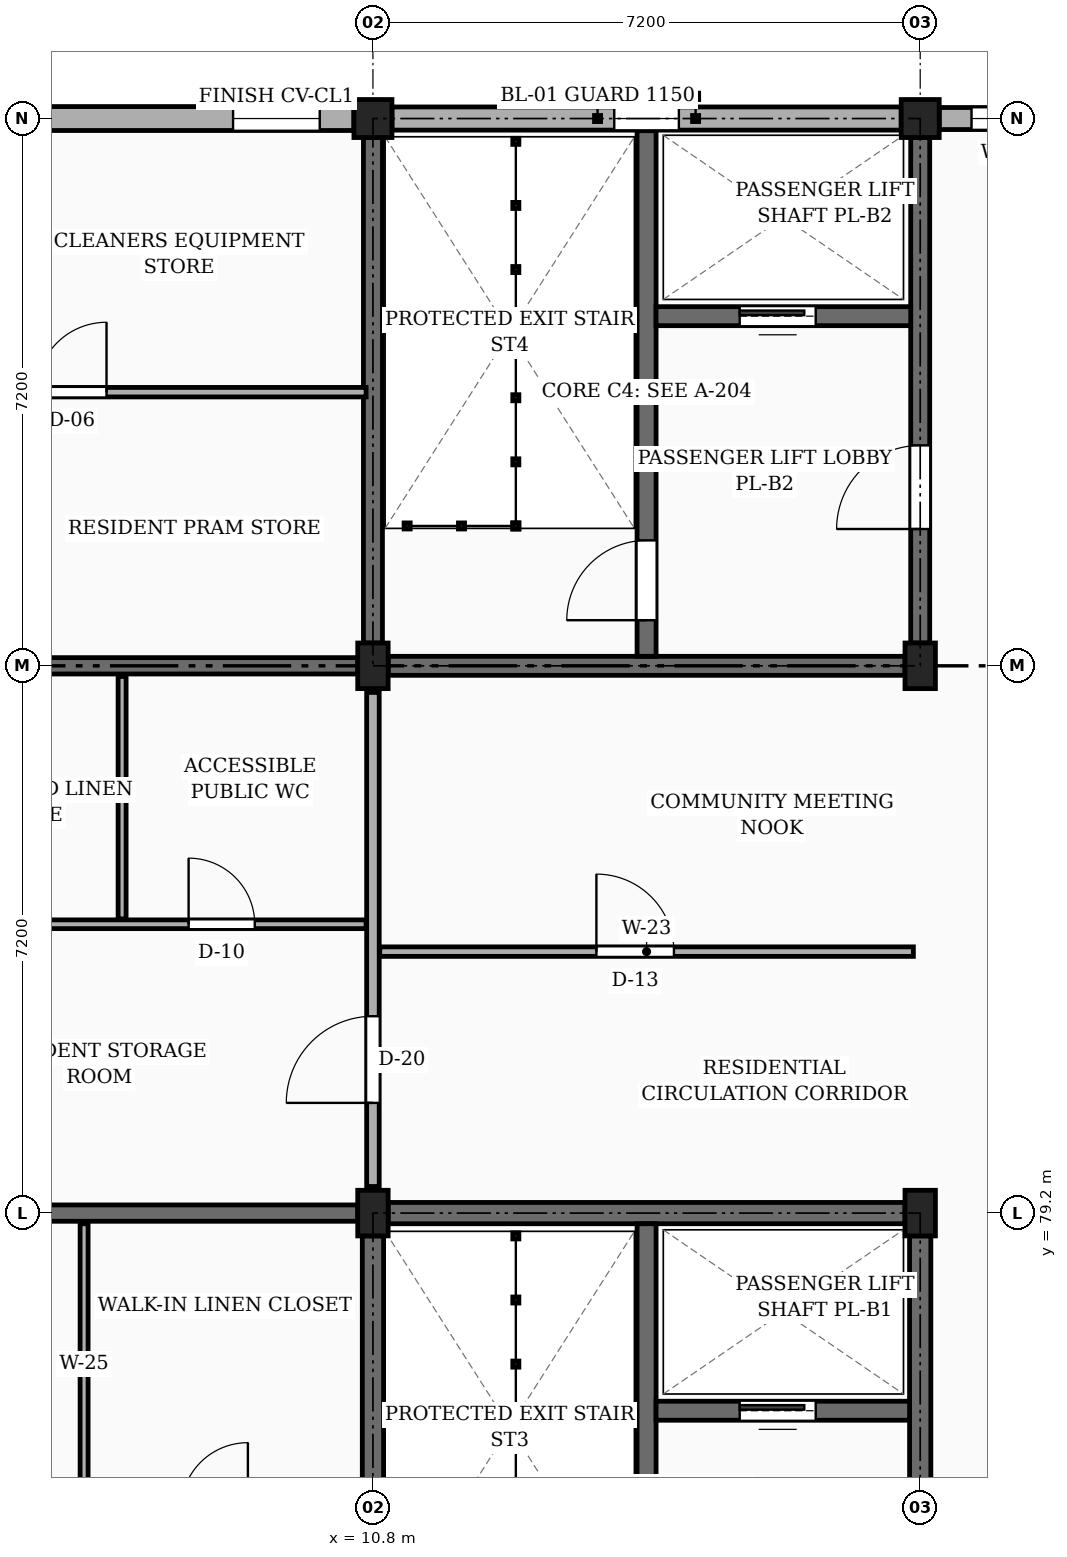
"""IFC4 building model, lengths in metres.
Left out: names, types, materials, properties, quantities, classifications, styles, units other than length and angle.
Written with IfcOpenShell. Run it as: python <this file> out.ifc"""

import sys

from ifc_helpers import new_model, si_unit, direction, frame, frame_2d, origin, origin_2d, place, context, subcontext, project, spatial, rectangle, extrude, element, fill, save


model = new_model("IFC4")
c1 = context("Model", 3, precision=1e-05, world=origin(), true_north=direction((0.0, 1.0)))
c2 = subcontext(c1, "Body", "Model", "MODEL_VIEW")
j1 = project(units=[si_unit("LENGTHUNIT", "METRE"), si_unit("PLANEANGLEUNIT", "RADIAN")], contexts=[c1])
p1 = place(None, origin())
s1 = spatial("IfcSite", under=j1, at=p1, CompositionType="ELEMENT")
p2 = place(p1, origin())
s2 = spatial("IfcBuilding", under=s1, at=p2, CompositionType="ELEMENT")
p3 = place(p2, frame((0.0, 0.0, 26.55)))
s3 = spatial("IfcBuildingStorey", under=s2, at=p3, CompositionType="ELEMENT", Elevation=26.55)
for number, where, z_axis, x_axis in (
    (1, (10.8, 79.2, 0.0), (0.0, 0.0, 1.0), (1.0, 0.0, 0.0)),
    (2, (10.8, 86.4, 0.0), (0.0, 0.0, 1.0), (1.0, 0.0, 0.0)),
):
    element("IfcColumn", number, at=place(p3, frame(where, z_axis=z_axis, x_axis=x_axis)), inside=s3, PredefinedType="COLUMN", context=c2, shape_type="SweptSolid", body=[
        extrude(rectangle(XDim=0.4, YDim=0.6, at=origin_2d()), origin(), (0.0, 0.0, 1.0), 3.15),
    ])
p4 = place(p3, frame((10.8, 93.6, 0.0), z_axis=(0.0, 0.0, 1.0), x_axis=(1.0, 0.0, 0.0)))
e3 = element("IfcColumn", 3, at=p4, inside=s3, PredefinedType="COLUMN", context=c2, shape_type="SweptSolid", body=[
    extrude(rectangle(XDim=0.5, YDim=0.5, at=origin_2d()), origin(), (0.0, 0.0, 1.0), 3.15),
])
for number, where, z_axis, x_axis in (
    (4, (18.0, 79.2, 0.0), (0.0, 0.0, 1.0), (1.0, 0.0, 0.0)),
    (5, (18.0, 86.4, 0.0), (0.0, 0.0, 1.0), (1.0, 0.0, 0.0)),
):
    element("IfcColumn", number, at=place(p3, frame(where, z_axis=z_axis, x_axis=x_axis)), inside=s3, PredefinedType="COLUMN", context=c2, shape_type="SweptSolid", body=[
        extrude(rectangle(XDim=0.4, YDim=0.6, at=origin_2d()), origin(), (0.0, 0.0, 1.0), 3.15),
    ])
p5 = place(p3, frame((18.0, 93.6, 0.0), z_axis=(0.0, 0.0, 1.0), x_axis=(1.0, 0.0, 0.0)))
e6 = element("IfcColumn", 6, at=p5, inside=s3, PredefinedType="COLUMN", context=c2, shape_type="SweptSolid", body=[
    extrude(rectangle(XDim=0.5, YDim=0.5, at=origin_2d()), origin(), (0.0, 0.0, 1.0), 3.15),
])
p6 = place(p3, frame((3.85, 79.2, 0.0), z_axis=(0.0, 0.0, 1.0), x_axis=(1.0, 0.0, 0.0)))
e7 = element("IfcWall", 7, at=p6, inside=s3, PredefinedType="SOLIDWALL", context=c2, shape_type="SweptSolid", body=[
    extrude(rectangle(XDim=6.75, YDim=0.215, at=frame_2d((3.375, 0.0))), origin(), (0.0, 0.0, 1.0), 2.22),
])
p7 = place(p3, frame((3.85, 86.4, 0.0), z_axis=(0.0, 0.0, 1.0), x_axis=(1.0, 0.0, 0.0)))
e8 = element("IfcWall", 8, at=p7, inside=s3, PredefinedType="SOLIDWALL", context=c2, shape_type="SweptSolid", body=[
    extrude(rectangle(XDim=6.75, YDim=0.215, at=frame_2d((3.375, 0.0))), origin(), (0.0, 0.0, 1.0), 2.22),
])
p8 = place(p7, frame((1.35, 0.0, 0.0)))
e9 = element("IfcOpeningElement", 9, at=p8, cuts=e8, PredefinedType="OPENING", context=c2, shape_type="SweptSolid", body=[
    extrude(rectangle(XDim=0.98, YDim=2.12, at=frame_2d((0.49, 1.06))), frame((0.0, 0.118, 0.0), z_axis=(0.0, -1.0, 0.0), x_axis=(1.0, 0.0, 0.0)), (0.0, 0.0, 1.0), 0.235),
])
p9 = place(p3, frame((24.95, 93.6, 0.0), z_axis=(0.0, 0.0, 1.0), x_axis=(-1.0, 0.0, 0.0)))
e10 = element("IfcWall", 10, at=p9, inside=s3, PredefinedType="SOLIDWALL", context=c2, shape_type="SweptSolid", body=[
    extrude(rectangle(XDim=6.7, YDim=0.29, at=frame_2d((3.35, 0.0))), origin(), (0.0, 0.0, 1.0), 2.46),
])
p10 = place(p9, frame((0.785, 0.0, 0.78)))
e11 = element("IfcOpeningElement", 11, at=p10, cuts=e10, PredefinedType="OPENING", context=c2, shape_type="SweptSolid", body=[
    extrude(rectangle(XDim=1.44, YDim=1.26, at=frame_2d((0.72, 0.63))), frame((0.0, 0.155, 0.0), z_axis=(0.0, -1.0, 0.0), x_axis=(1.0, 0.0, 0.0)), (0.0, 0.0, 1.0), 0.31),
])
p11 = place(p9, frame((3.37, 0.0, 0.78)))
e12 = element("IfcOpeningElement", 12, at=p11, cuts=e10, PredefinedType="OPENING", context=c2, shape_type="SweptSolid", body=[
    extrude(rectangle(XDim=0.98, YDim=1.36, at=frame_2d((0.49, 0.68))), frame((0.0, 0.155, 0.0), z_axis=(0.0, -1.0, 0.0), x_axis=(1.0, 0.0, 0.0)), (0.0, 0.0, 1.0), 0.31),
])
p12 = place(p9, frame((5.135, 0.0, 0.78)))
e13 = element("IfcOpeningElement", 13, at=p12, cuts=e10, PredefinedType="OPENING", context=c2, shape_type="SweptSolid", body=[
    extrude(rectangle(XDim=1.14, YDim=1.36, at=frame_2d((0.57, 0.68))), frame((0.0, 0.155, 0.0), z_axis=(0.0, -1.0, 0.0), x_axis=(1.0, 0.0, 0.0)), (0.0, 0.0, 1.0), 0.31),
])
p13 = place(p3, frame((17.75, 93.6, 0.0), z_axis=(0.0, 0.0, 1.0), x_axis=(-1.0, 0.0, 0.0)))
e14 = element("IfcWall", 14, at=p13, inside=s3, PredefinedType="SOLIDWALL", context=c2, shape_type="SweptSolid", body=[
    extrude(rectangle(XDim=6.7, YDim=0.305, at=frame_2d((3.35, 0.0))), origin(), (0.0, 0.0, 1.0), 2.46),
])
p14 = place(p13, frame((2.925, 0.0, 0.9)))
e15 = element("IfcOpeningElement", 15, at=p14, cuts=e14, PredefinedType="OPENING", context=c2, shape_type="SweptSolid", body=[
    extrude(rectangle(XDim=0.85, YDim=1.15, at=frame_2d((0.425, 0.575))), frame((0.0, 0.163, 0.0), z_axis=(0.0, -1.0, 0.0), x_axis=(1.0, 0.0, 0.0)), (0.0, 0.0, 1.0), 0.325),
])
p15 = place(p3, frame((10.55, 93.6, 0.0), z_axis=(0.0, 0.0, 1.0), x_axis=(-1.0, 0.0, 0.0)))
e16 = element("IfcWall", 16, at=p15, inside=s3, PredefinedType="SOLIDWALL", context=c2, shape_type="SweptSolid", body=[
    extrude(rectangle(XDim=6.7, YDim=0.315, at=frame_2d((3.35, 0.0))), origin(), (0.0, 0.0, 1.0), 2.46),
])
p16 = place(p15, frame((0.45, 0.0, 0.78)))
e17 = element("IfcOpeningElement", 17, at=p16, cuts=e16, PredefinedType="OPENING", context=c2, shape_type="SweptSolid", body=[
    extrude(rectangle(XDim=1.14, YDim=1.36, at=frame_2d((0.57, 0.68))), frame((0.0, 0.167, 0.0), z_axis=(0.0, -1.0, 0.0), x_axis=(1.0, 0.0, 0.0)), (0.0, 0.0, 1.0), 0.335),
])
p17 = place(p15, frame((4.65, 0.0, 0.78)))
e18 = element("IfcOpeningElement", 18, at=p17, cuts=e16, PredefinedType="OPENING", context=c2, shape_type="SweptSolid", body=[
    extrude(rectangle(XDim=1.3, YDim=1.36, at=frame_2d((0.65, 0.68))), frame((0.0, 0.167, 0.0), z_axis=(0.0, -1.0, 0.0), x_axis=(1.0, 0.0, 0.0)), (0.0, 0.0, 1.0), 0.335),
])
p18 = place(p3, frame((10.8, 72.3, 0.0), z_axis=(0.0, 0.0, 1.0), x_axis=(0.0, 1.0, 0.0)))
e19 = element("IfcWall", 19, at=p18, inside=s3, PredefinedType="SHEAR", context=c2, shape_type="SweptSolid", body=[
    extrude(rectangle(XDim=6.6, YDim=0.28, at=frame_2d((3.3, 0.0))), origin(), (0.0, 0.0, 1.0), 2.89),
])
p19 = place(p3, frame((11.0, 79.2, 0.0), z_axis=(0.0, 0.0, 1.0), x_axis=(1.0, 0.0, 0.0)))
e20 = element("IfcWall", 20, at=p19, inside=s3, PredefinedType="SHEAR", context=c2, shape_type="SweptSolid", body=[
    extrude(rectangle(XDim=6.8, YDim=0.28, at=frame_2d((3.4, 0.0))), origin(), (0.0, 0.0, 1.0), 2.89),
])
p20 = place(p3, frame((18.0, 72.3, 0.0), z_axis=(0.0, 0.0, 1.0), x_axis=(0.0, 1.0, 0.0)))
e21 = element("IfcWall", 21, at=p20, inside=s3, PredefinedType="SHEAR", context=c2, shape_type="SweptSolid", body=[
    extrude(rectangle(XDim=6.6, YDim=0.28, at=frame_2d((3.3, 0.0))), origin(), (0.0, 0.0, 1.0), 2.89),
])
p21 = place(p20, frame((1.5, 0.0, 0.0)))
e22 = element("IfcOpeningElement", 22, at=p21, cuts=e21, PredefinedType="OPENING", context=c2, shape_type="SweptSolid", body=[
    extrude(rectangle(XDim=1.1, YDim=2.15, at=frame_2d((0.55, 1.075))), frame((0.0, 0.15, 0.0), z_axis=(0.0, -1.0, 0.0), x_axis=(1.0, 0.0, 0.0)), (0.0, 0.0, 1.0), 0.3),
])
p22 = place(p3, frame((14.4, 72.14, 0.0), z_axis=(0.0, 0.0, 1.0), x_axis=(0.0, 1.0, 0.0)))
e23 = element("IfcWall", 23, at=p22, inside=s3, PredefinedType="SHEAR", context=c2, shape_type="SweptSolid", body=[
    extrude(rectangle(XDim=6.92, YDim=0.25, at=frame_2d((3.46, 0.0))), origin(), (0.0, 0.0, 1.0), 2.89),
])
p23 = place(p22, frame((0.46, 0.0, 0.0)))
e24 = element("IfcOpeningElement", 24, at=p23, cuts=e23, PredefinedType="OPENING", context=c2, shape_type="SweptSolid", body=[
    extrude(rectangle(XDim=1.05, YDim=2.15, at=frame_2d((0.525, 1.075))), frame((0.0, 0.135, 0.0), z_axis=(0.0, -1.0, 0.0), x_axis=(1.0, 0.0, 0.0)), (0.0, 0.0, 1.0), 0.27),
])
p24 = place(p3, frame((14.525, 76.6, 0.0), z_axis=(0.0, 0.0, 1.0), x_axis=(1.0, 0.0, 0.0)))
e25 = element("IfcWall", 25, at=p24, inside=s3, PredefinedType="SHEAR", context=c2, shape_type="SweptSolid", body=[
    extrude(rectangle(XDim=3.335, YDim=0.25, at=frame_2d((1.667, 0.0))), origin(), (0.0, 0.0, 1.0), 2.89),
])
p25 = place(p24, frame((1.1, 0.0, 0.0)))
e26 = element("IfcOpeningElement", 26, at=p25, cuts=e25, PredefinedType="OPENING", context=c2, shape_type="SweptSolid", body=[
    extrude(rectangle(XDim=1.0, YDim=2.2, at=frame_2d((0.5, 1.1))), frame((0.0, 0.135, 0.0), z_axis=(0.0, -1.0, 0.0), x_axis=(1.0, 0.0, 0.0)), (0.0, 0.0, 1.0), 0.27),
])
p26 = place(p3, frame((10.8, 86.7, 0.0), z_axis=(0.0, 0.0, 1.0), x_axis=(0.0, 1.0, 0.0)))
e27 = element("IfcWall", 27, at=p26, inside=s3, PredefinedType="SHEAR", context=c2, shape_type="SweptSolid", body=[
    extrude(rectangle(XDim=6.65, YDim=0.25, at=frame_2d((3.325, 0.0))), origin(), (0.0, 0.0, 1.0), 2.89),
])
p27 = place(p3, frame((18.0, 86.7, 0.0), z_axis=(0.0, 0.0, 1.0), x_axis=(0.0, 1.0, 0.0)))
e28 = element("IfcWall", 28, at=p27, inside=s3, PredefinedType="SHEAR", context=c2, shape_type="SweptSolid", body=[
    extrude(rectangle(XDim=6.65, YDim=0.25, at=frame_2d((3.325, 0.0))), origin(), (0.0, 0.0, 1.0), 2.89),
])
p28 = place(p27, frame((1.5, 0.0, 0.0)))
e29 = element("IfcOpeningElement", 29, at=p28, cuts=e28, PredefinedType="OPENING", context=c2, shape_type="SweptSolid", body=[
    extrude(rectangle(XDim=1.1, YDim=2.15, at=frame_2d((0.55, 1.075))), frame((0.0, 0.135, 0.0), z_axis=(0.0, -1.0, 0.0), x_axis=(1.0, 0.0, 0.0)), (0.0, 0.0, 1.0), 0.27),
])
p29 = place(p3, frame((11.0, 86.4, 0.0), z_axis=(0.0, 0.0, 1.0), x_axis=(1.0, 0.0, 0.0)))
e30 = element("IfcWall", 30, at=p29, inside=s3, PredefinedType="SHEAR", context=c2, shape_type="SweptSolid", body=[
    extrude(rectangle(XDim=6.8, YDim=0.25, at=frame_2d((3.4, 0.0))), origin(), (0.0, 0.0, 1.0), 2.89),
])
p30 = place(p3, frame((14.4, 86.525, 0.0), z_axis=(0.0, 0.0, 1.0), x_axis=(0.0, 1.0, 0.0)))
e31 = element("IfcWall", 31, at=p30, inside=s3, PredefinedType="SHEAR", context=c2, shape_type="SweptSolid", body=[
    extrude(rectangle(XDim=6.915, YDim=0.25, at=frame_2d((3.458, 0.0))), origin(), (0.0, 0.0, 1.0), 2.89),
])
p31 = place(p30, frame((0.475, 0.0, 0.0)))
e32 = element("IfcOpeningElement", 32, at=p31, cuts=e31, PredefinedType="OPENING", context=c2, shape_type="SweptSolid", body=[
    extrude(rectangle(XDim=1.05, YDim=2.15, at=frame_2d((0.525, 1.075))), frame((0.0, 0.135, 0.0), z_axis=(0.0, -1.0, 0.0), x_axis=(1.0, 0.0, 0.0)), (0.0, 0.0, 1.0), 0.27),
])
p32 = place(p3, frame((14.525, 91.0, 0.0), z_axis=(0.0, 0.0, 1.0), x_axis=(1.0, 0.0, 0.0)))
e33 = element("IfcWall", 33, at=p32, inside=s3, PredefinedType="SHEAR", context=c2, shape_type="SweptSolid", body=[
    extrude(rectangle(XDim=3.35, YDim=0.25, at=frame_2d((1.675, 0.0))), origin(), (0.0, 0.0, 1.0), 2.89),
])
p33 = place(p32, frame((1.1, 0.0, 0.0)))
e34 = element("IfcOpeningElement", 34, at=p33, cuts=e33, PredefinedType="OPENING", context=c2, shape_type="SweptSolid", body=[
    extrude(rectangle(XDim=1.0, YDim=2.2, at=frame_2d((0.5, 1.1))), frame((0.0, 0.135, 0.0), z_axis=(0.0, -1.0, 0.0), x_axis=(1.0, 0.0, 0.0)), (0.0, 0.0, 1.0), 0.27),
])
p34 = place(p3, frame((10.8, 79.55, 0.0), z_axis=(0.0, 0.0, 1.0), x_axis=(0.0, 1.0, 0.0)))
e35 = element("IfcWall", 35, at=p34, inside=s3, PredefinedType="PARTITIONING", context=c2, shape_type="SweptSolid", body=[
    extrude(rectangle(XDim=6.5, YDim=0.165, at=frame_2d((3.25, 0.0))), origin(), (0.0, 0.0, 1.0), 2.325),
])
p35 = place(p34, frame((1.1, 0.0, 0.0)))
e36 = element("IfcOpeningElement", 36, at=p35, cuts=e35, PredefinedType="OPENING", context=c2, shape_type="SweptSolid", body=[
    extrude(rectangle(XDim=1.14, YDim=2.18, at=frame_2d((0.57, 1.09))), frame((0.0, 0.093, 0.0), z_axis=(0.0, -1.0, 0.0), x_axis=(1.0, 0.0, 0.0)), (0.0, 0.0, 1.0), 0.185),
])
p36 = place(p3, frame((7.0, 75.37, 0.0), z_axis=(0.0, 0.0, 1.0), x_axis=(0.0, 1.0, 0.0)))
e37 = element("IfcWall", 37, at=p36, inside=s3, PredefinedType="PARTITIONING", context=c2, shape_type="SweptSolid", body=[
    extrude(rectangle(XDim=3.69, YDim=0.105, at=frame_2d((1.845, 0.0))), origin(), (0.0, 0.0, 1.0), 2.325),
])
p37 = place(p3, frame((10.89, 82.64, 0.0), z_axis=(0.0, 0.0, 1.0), x_axis=(1.0, 0.0, 0.0)))
e38 = element("IfcWall", 38, at=p37, inside=s3, PredefinedType="PARTITIONING", context=c2, shape_type="SweptSolid", body=[
    extrude(rectangle(XDim=7.02, YDim=0.125, at=frame_2d((3.51, 0.0))), origin(), (0.0, 0.0, 1.0), 2.325),
])
p38 = place(p37, frame((2.85, 0.0, 0.0)))
e39 = element("IfcOpeningElement", 39, at=p38, cuts=e38, PredefinedType="OPENING", context=c2, shape_type="SweptSolid", body=[
    extrude(rectangle(XDim=1.02, YDim=2.15, at=frame_2d((0.51, 1.075))), frame((0.0, 0.073, 0.0), z_axis=(0.0, -1.0, 0.0), x_axis=(1.0, 0.0, 0.0)), (0.0, 0.0, 1.0), 0.145),
])
p39 = place(p3, frame((3.775, 83.0, 0.0), z_axis=(0.0, 0.0, 1.0), x_axis=(1.0, 0.0, 0.0)))
e40 = element("IfcWall", 40, at=p39, inside=s3, PredefinedType="PARTITIONING", context=c2, shape_type="SweptSolid", body=[
    extrude(rectangle(XDim=6.935, YDim=0.115, at=frame_2d((3.468, 0.0))), origin(), (0.0, 0.0, 1.0), 2.325),
])
p40 = place(p39, frame((4.6, 0.0, 0.0)))
e41 = element("IfcOpeningElement", 41, at=p40, cuts=e40, PredefinedType="OPENING", context=c2, shape_type="SweptSolid", body=[
    extrude(rectangle(XDim=0.87, YDim=2.05, at=frame_2d((0.435, 1.025))), frame((0.0, 0.067, 0.0), z_axis=(0.0, -1.0, 0.0), x_axis=(1.0, 0.0, 0.0)), (0.0, 0.0, 1.0), 0.135),
])
p41 = place(p39, frame((1.2, 0.0, 0.0)))
e42 = element("IfcOpeningElement", 42, at=p41, cuts=e40, PredefinedType="OPENING", context=c2, shape_type="SweptSolid", body=[
    extrude(rectangle(XDim=0.92, YDim=2.1, at=frame_2d((0.46, 1.05))), frame((0.0, 0.067, 0.0), z_axis=(0.0, -1.0, 0.0), x_axis=(1.0, 0.0, 0.0)), (0.0, 0.0, 1.0), 0.135),
])
p42 = place(p3, frame((7.5, 83.07, 0.0), z_axis=(0.0, 0.0, 1.0), x_axis=(0.0, 1.0, 0.0)))
e43 = element("IfcWall", 43, at=p42, inside=s3, PredefinedType="PARTITIONING", context=c2, shape_type="SweptSolid", body=[
    extrude(rectangle(XDim=3.19, YDim=0.105, at=frame_2d((1.595, 0.0))), origin(), (0.0, 0.0, 1.0), 2.325),
])
p43 = place(p3, frame((3.775, 90.0, 0.0), z_axis=(0.0, 0.0, 1.0), x_axis=(1.0, 0.0, 0.0)))
e44 = element("IfcWall", 44, at=p43, inside=s3, PredefinedType="PARTITIONING", context=c2, shape_type="SweptSolid", body=[
    extrude(rectangle(XDim=6.935, YDim=0.125, at=frame_2d((3.468, 0.0))), origin(), (0.0, 0.0, 1.0), 2.325),
])
p44 = place(p43, frame((2.6, 0.0, 0.0)))
e45 = element("IfcOpeningElement", 45, at=p44, cuts=e44, PredefinedType="OPENING", context=c2, shape_type="SweptSolid", body=[
    extrude(rectangle(XDim=0.92, YDim=2.1, at=frame_2d((0.46, 1.05))), frame((0.0, 0.073, 0.0), z_axis=(0.0, -1.0, 0.0), x_axis=(1.0, 0.0, 0.0)), (0.0, 0.0, 1.0), 0.145),
])
p45 = place(p12, origin())
e46 = element("IfcWindow", 46, at=p45, inside=s3, PartitioningType="SINGLE_PANEL", PredefinedType="WINDOW", context=c2, shape_type="SweptSolid", body=[
    extrude(rectangle(XDim=1.14, YDim=1.36, at=frame_2d((0.57, 0.68))), frame((0.0, 0.03, 0.0), z_axis=(0.0, -1.0, 0.0), x_axis=(1.0, 0.0, 0.0)), (0.0, 0.0, 1.0), 0.06),
])
fill(e13, e46)
p46 = place(p14, origin())
e47 = element("IfcWindow", 47, at=p46, inside=s3, PartitioningType="SINGLE_PANEL", PredefinedType="WINDOW", context=c2, shape_type="SweptSolid", body=[
    extrude(rectangle(XDim=0.85, YDim=1.15, at=frame_2d((0.425, 0.575))), frame((0.0, 0.03, 0.0), z_axis=(0.0, -1.0, 0.0), x_axis=(1.0, 0.0, 0.0)), (0.0, 0.0, 1.0), 0.06),
])
fill(e15, e47)
p47 = place(p16, origin())
e48 = element("IfcWindow", 48, at=p47, inside=s3, PartitioningType="SINGLE_PANEL", PredefinedType="WINDOW", context=c2, shape_type="SweptSolid", body=[
    extrude(rectangle(XDim=1.14, YDim=1.36, at=frame_2d((0.57, 0.68))), frame((0.0, 0.03, 0.0), z_axis=(0.0, -1.0, 0.0), x_axis=(1.0, 0.0, 0.0)), (0.0, 0.0, 1.0), 0.06),
])
fill(e17, e48)
p48 = place(p25, origin())
e49 = element("IfcDoor", 49, at=p48, inside=s3, OperationType="SLIDING_TO_LEFT", PredefinedType="DOOR", context=c2, shape_type="SweptSolid", body=[
    extrude(rectangle(XDim=1.0, YDim=2.2, at=frame_2d((0.5, 1.1))), frame((0.0, 0.025, 0.0), z_axis=(0.0, -1.0, 0.0), x_axis=(1.0, 0.0, 0.0)), (0.0, 0.0, 1.0), 0.05),
])
fill(e26, e49)
p49 = place(p28, frame((1.1, 0.0, 0.0), z_axis=(0.0, 0.0, 1.0), x_axis=(-1.0, 0.0, 0.0)))
e50 = element("IfcDoor", 50, at=p49, inside=s3, OperationType="SINGLE_SWING_LEFT", PredefinedType="DOOR", context=c2, shape_type="SweptSolid", body=[
    extrude(rectangle(XDim=1.1, YDim=2.15, at=frame_2d((0.55, 1.075))), frame((0.0, 0.025, 0.0), z_axis=(0.0, -1.0, 0.0), x_axis=(1.0, 0.0, 0.0)), (0.0, 0.0, 1.0), 0.05),
])
fill(e29, e50)
p50 = place(p31, origin())
e51 = element("IfcDoor", 51, at=p50, inside=s3, OperationType="SINGLE_SWING_LEFT", PredefinedType="DOOR", context=c2, shape_type="SweptSolid", body=[
    extrude(rectangle(XDim=1.05, YDim=2.15, at=frame_2d((0.525, 1.075))), frame((0.0, 0.025, 0.0), z_axis=(0.0, -1.0, 0.0), x_axis=(1.0, 0.0, 0.0)), (0.0, 0.0, 1.0), 0.05),
])
fill(e32, e51)
p51 = place(p33, origin())
e52 = element("IfcDoor", 52, at=p51, inside=s3, OperationType="SLIDING_TO_LEFT", PredefinedType="DOOR", context=c2, shape_type="SweptSolid", body=[
    extrude(rectangle(XDim=1.0, YDim=2.2, at=frame_2d((0.5, 1.1))), frame((0.0, 0.025, 0.0), z_axis=(0.0, -1.0, 0.0), x_axis=(1.0, 0.0, 0.0)), (0.0, 0.0, 1.0), 0.05),
])
fill(e34, e52)
p52 = place(p35, origin())
e53 = element("IfcDoor", 53, at=p52, inside=s3, OperationType="SINGLE_SWING_LEFT", PredefinedType="DOOR", context=c2, shape_type="SweptSolid", body=[
    extrude(rectangle(XDim=1.14, YDim=2.18, at=frame_2d((0.57, 1.09))), frame((0.0, 0.025, 0.0), z_axis=(0.0, -1.0, 0.0), x_axis=(1.0, 0.0, 0.0)), (0.0, 0.0, 1.0), 0.05),
])
fill(e36, e53)
p53 = place(p38, origin())
e54 = element("IfcDoor", 54, at=p53, inside=s3, OperationType="SINGLE_SWING_LEFT", PredefinedType="DOOR", context=c2, shape_type="SweptSolid", body=[
    extrude(rectangle(XDim=1.02, YDim=2.15, at=frame_2d((0.51, 1.075))), frame((0.0, 0.025, 0.0), z_axis=(0.0, -1.0, 0.0), x_axis=(1.0, 0.0, 0.0)), (0.0, 0.0, 1.0), 0.05),
])
fill(e39, e54)
p54 = place(p40, origin())
e55 = element("IfcDoor", 55, at=p54, inside=s3, OperationType="SINGLE_SWING_LEFT", PredefinedType="DOOR", context=c2, shape_type="SweptSolid", body=[
    extrude(rectangle(XDim=0.87, YDim=2.05, at=frame_2d((0.435, 1.025))), frame((0.0, 0.025, 0.0), z_axis=(0.0, -1.0, 0.0), x_axis=(1.0, 0.0, 0.0)), (0.0, 0.0, 1.0), 0.05),
])
fill(e41, e55)
p55 = place(p44, origin())
e56 = element("IfcDoor", 56, at=p55, inside=s3, OperationType="SINGLE_SWING_RIGHT", PredefinedType="DOOR", context=c2, shape_type="SweptSolid", body=[
    extrude(rectangle(XDim=0.92, YDim=2.1, at=frame_2d((0.46, 1.05))), frame((0.0, 0.025, 0.0), z_axis=(0.0, -1.0, 0.0), x_axis=(1.0, 0.0, 0.0)), (0.0, 0.0, 1.0), 0.05),
])
fill(e45, e56)
save(model, sys.argv[1])
